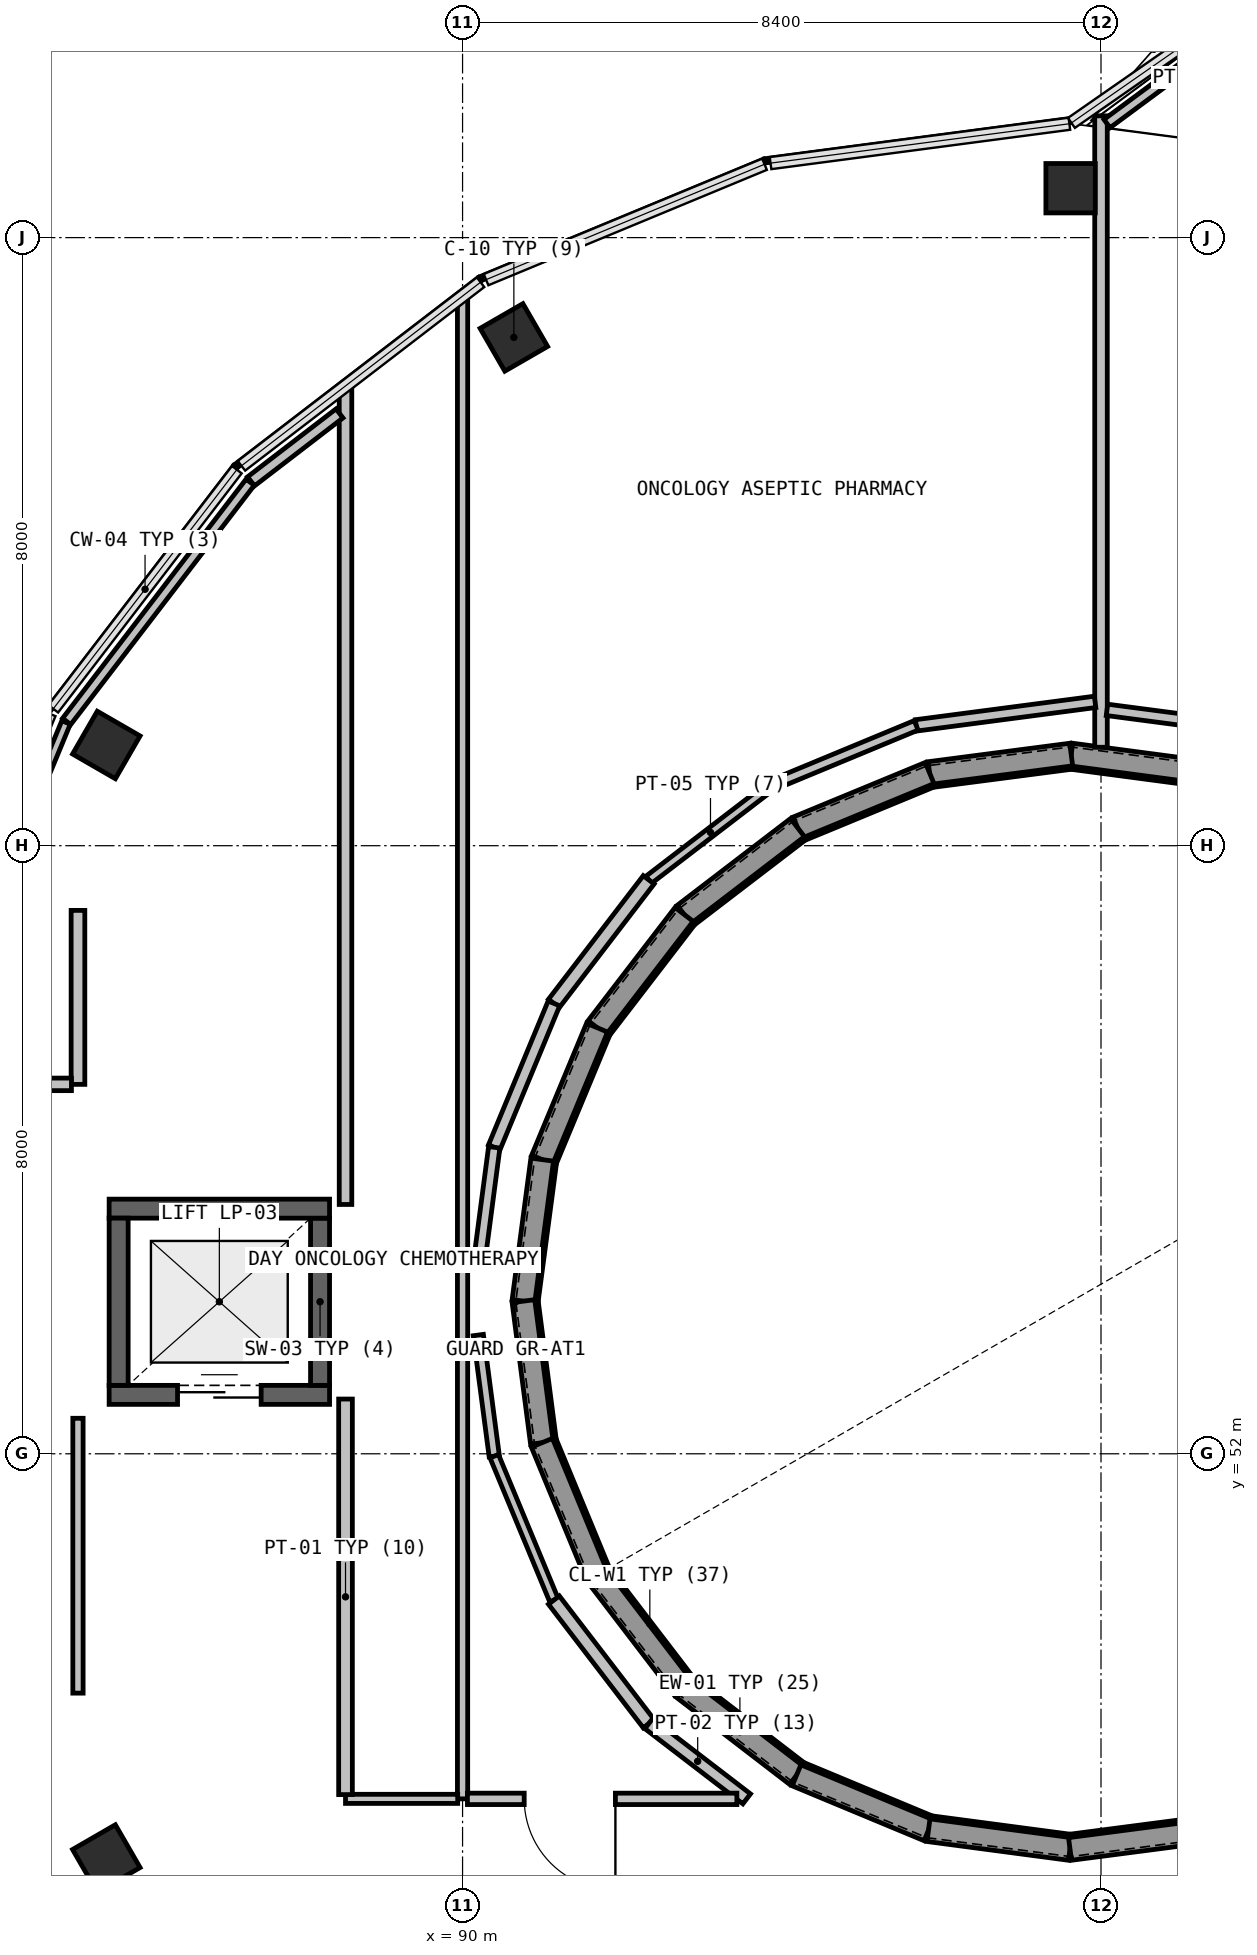
"""IFC4 building model, lengths in metres.
Left out: names, types, materials, properties, quantities, classifications, styles, units other than length and angle.
Written with IfcOpenShell. Run it as: python <this file> out.ifc"""

import sys

from ifc_helpers import new_model, si_unit, direction, frame, frame_2d, origin, origin_2d, place, context, subcontext, project, spatial, rectangle, circle, extrude, element, fill, save


model = new_model("IFC4")
c1 = context("Model", 3, precision=1e-05, world=origin(), true_north=direction((0.0, 1.0)))
c2 = subcontext(c1, "Body", "Model", "MODEL_VIEW")
j1 = project(units=[si_unit("LENGTHUNIT", "METRE"), si_unit("PLANEANGLEUNIT", "RADIAN")], contexts=[c1])
p1 = place(None, origin())
s1 = spatial("IfcSite", under=j1, at=p1, CompositionType="ELEMENT")
p2 = place(p1, origin())
s2 = spatial("IfcBuilding", under=s1, at=p2, CompositionType="ELEMENT")
p3 = place(p2, frame((0.0, 0.0, 15.0)))
s3 = spatial("IfcBuildingStorey", under=s2, at=p3, CompositionType="ELEMENT", Elevation=15.0)
for number, where, z_axis, x_axis in (
    (1, (98.0, 68.65, 0.0), (0.0, 0.0, 1.0), (0.0, 1.0, 0.0)),
    (2, (90.675, 66.687, 0.0), (0.0, 0.0, 1.0), (-0.5, 0.866, 0.0)),
    (3, (85.313, 61.325, 0.0), (0.0, 0.0, 1.0), (-0.866, 0.5, 0.0)),
    (4, (85.313, 46.675, 0.0), (0.0, 0.0, 1.0), (-0.866, -0.5, 0.0)),
):
    element("IfcColumn", number, at=place(p3, frame(where, z_axis=z_axis, x_axis=x_axis)), inside=s3, PredefinedType="COLUMN", context=c2, shape_type="SweptSolid", body=[
        extrude(circle(Radius=0.325, at=origin_2d()), origin(), (0.0, 0.0, 1.0), 4.2),
    ])
p4 = place(p3, frame((99.87, 60.952, 0.0), z_axis=(0.0, 0.0, 1.0), x_axis=(-0.991311701137, 0.131533688416, 0.0)))
e5 = element("IfcWall", 5, at=p4, inside=s3, PredefinedType="SOLIDWALL", context=c2, shape_type="SweptSolid", body=[
    extrude(rectangle(XDim=1.878, YDim=0.3, at=frame_2d((0.939, 0.0))), origin(), (0.0, 0.0, 1.0), 3.895),
])
p5 = place(p3, frame((98.008, 61.199, 0.0), z_axis=(0.0, 0.0, 1.0), x_axis=(-0.991606206969, -0.129294741965, 0.0)))
e6 = element("IfcWall", 6, at=p5, inside=s3, PredefinedType="SOLIDWALL", context=c2, shape_type="SweptSolid", body=[
    extrude(rectangle(XDim=1.879, YDim=0.3, at=frame_2d((0.939, 0.0))), origin(), (0.0, 0.0, 1.0), 3.895),
])
p6 = place(p3, frame((96.145, 60.956, 0.0), z_axis=(0.0, 0.0, 1.0), x_axis=(-0.924236528401, -0.381820428435, 0.0)))
e7 = element("IfcWall", 7, at=p6, inside=s3, PredefinedType="SOLIDWALL", context=c2, shape_type="SweptSolid", body=[
    extrude(rectangle(XDim=1.881, YDim=0.3, at=frame_2d((0.94, 0.0))), origin(), (0.0, 0.0, 1.0), 3.895),
])
p7 = place(p3, frame((94.407, 60.238, 0.0), z_axis=(0.0, 0.0, 1.0), x_axis=(-0.79405161161, -0.607850341861, 0.0)))
e8 = element("IfcWall", 8, at=p7, inside=s3, PredefinedType="SOLIDWALL", context=c2, shape_type="SweptSolid", body=[
    extrude(rectangle(XDim=1.879, YDim=0.3, at=frame_2d((0.939, 0.0))), origin(), (0.0, 0.0, 1.0), 3.895),
])
p8 = place(p3, frame((92.915, 59.096, 0.0), z_axis=(0.0, 0.0, 1.0), x_axis=(-0.609333966613, -0.792913688324, 0.0)))
e9 = element("IfcWall", 9, at=p8, inside=s3, PredefinedType="SOLIDWALL", context=c2, shape_type="SweptSolid", body=[
    extrude(rectangle(XDim=1.879, YDim=0.3, at=frame_2d((0.939, 0.0))), origin(), (0.0, 0.0, 1.0), 3.895),
])
p9 = place(p3, frame((91.77, 57.606, 0.0), z_axis=(0.0, 0.0, 1.0), x_axis=(-0.384006709406, -0.923330302292, 0.0)))
e10 = element("IfcWall", 10, at=p9, inside=s3, PredefinedType="SOLIDWALL", context=c2, shape_type="SweptSolid", body=[
    extrude(rectangle(XDim=1.88, YDim=0.3, at=frame_2d((0.94, 0.0))), origin(), (0.0, 0.0, 1.0), 3.895),
])
p10 = place(p3, frame((91.048, 55.87, 0.0), z_axis=(0.0, 0.0, 1.0), x_axis=(-0.131533688416, -0.991311701137, 0.0)))
e11 = element("IfcWall", 11, at=p10, inside=s3, PredefinedType="SOLIDWALL", context=c2, shape_type="SweptSolid", body=[
    extrude(rectangle(XDim=1.878, YDim=0.3, at=frame_2d((0.939, 0.0))), origin(), (0.0, 0.0, 1.0), 3.895),
])
p11 = place(p3, frame((90.801, 54.008, 0.0), z_axis=(0.0, 0.0, 1.0), x_axis=(0.129294741965, -0.991606206969, 0.0)))
e12 = element("IfcWall", 12, at=p11, inside=s3, PredefinedType="SOLIDWALL", context=c2, shape_type="SweptSolid", body=[
    extrude(rectangle(XDim=1.879, YDim=0.3, at=frame_2d((0.939, 0.0))), origin(), (0.0, 0.0, 1.0), 3.895),
])
p12 = place(p3, frame((91.044, 52.145, 0.0), z_axis=(0.0, 0.0, 1.0), x_axis=(0.381820428435, -0.924236528401, 0.0)))
e13 = element("IfcWall", 13, at=p12, inside=s3, PredefinedType="SOLIDWALL", context=c2, shape_type="SweptSolid", body=[
    extrude(rectangle(XDim=1.881, YDim=0.3, at=frame_2d((0.94, 0.0))), origin(), (0.0, 0.0, 1.0), 3.895),
])
p13 = place(p3, frame((91.762, 50.407, 0.0), z_axis=(0.0, 0.0, 1.0), x_axis=(0.607850341861, -0.79405161161, 0.0)))
e14 = element("IfcWall", 14, at=p13, inside=s3, PredefinedType="SOLIDWALL", context=c2, shape_type="SweptSolid", body=[
    extrude(rectangle(XDim=1.879, YDim=0.3, at=frame_2d((0.939, 0.0))), origin(), (0.0, 0.0, 1.0), 3.895),
])
p14 = place(p3, frame((92.904, 48.915, 0.0), z_axis=(0.0, 0.0, 1.0), x_axis=(0.792913688324, -0.609333966613, 0.0)))
e15 = element("IfcWall", 15, at=p14, inside=s3, PredefinedType="SOLIDWALL", context=c2, shape_type="SweptSolid", body=[
    extrude(rectangle(XDim=1.879, YDim=0.3, at=frame_2d((0.939, 0.0))), origin(), (0.0, 0.0, 1.0), 3.895),
])
p15 = place(p3, frame((94.394, 47.77, 0.0), z_axis=(0.0, 0.0, 1.0), x_axis=(0.923330302292, -0.384006709406, 0.0)))
e16 = element("IfcWall", 16, at=p15, inside=s3, PredefinedType="SOLIDWALL", context=c2, shape_type="SweptSolid", body=[
    extrude(rectangle(XDim=1.88, YDim=0.3, at=frame_2d((0.94, 0.0))), origin(), (0.0, 0.0, 1.0), 3.895),
])
p16 = place(p3, frame((96.13, 47.048, 0.0), z_axis=(0.0, 0.0, 1.0), x_axis=(0.991311701137, -0.131533688416, 0.0)))
e17 = element("IfcWall", 17, at=p16, inside=s3, PredefinedType="SOLIDWALL", context=c2, shape_type="SweptSolid", body=[
    extrude(rectangle(XDim=1.878, YDim=0.3, at=frame_2d((0.939, 0.0))), origin(), (0.0, 0.0, 1.0), 3.895),
])
p17 = place(p3, frame((97.992, 46.801, 0.0), z_axis=(0.0, 0.0, 1.0), x_axis=(0.991606206969, 0.129294741965, 0.0)))
e18 = element("IfcWall", 18, at=p17, inside=s3, PredefinedType="SOLIDWALL", context=c2, shape_type="SweptSolid", body=[
    extrude(rectangle(XDim=1.879, YDim=0.3, at=frame_2d((0.939, 0.0))), origin(), (0.0, 0.0, 1.0), 3.895),
])
p18 = place(p3, frame((85.35, 52.775, 0.0), z_axis=(0.0, 0.0, 1.0), x_axis=(1.0, 0.0, 0.0)))
e19 = element("IfcWall", 19, at=p18, inside=s3, PredefinedType="SHEAR", context=c2, shape_type="SweptSolid", body=[
    extrude(rectangle(XDim=2.9, YDim=0.25, at=frame_2d((1.45, 0.0))), origin(), (0.0, 0.0, 1.0), 3.895),
])
p19 = place(p18, frame((0.9, 0.0, 0.0)))
e20 = element("IfcOpeningElement", 20, at=p19, cuts=e19, PredefinedType="OPENING", context=c2, shape_type="SweptSolid", body=[
    extrude(rectangle(XDim=1.1, YDim=2.15, at=frame_2d((0.55, 1.075))), frame((0.0, 0.135, 0.0), z_axis=(0.0, -1.0, 0.0), x_axis=(1.0, 0.0, 0.0)), (0.0, 0.0, 1.0), 0.27),
])
p20 = place(p3, frame((88.125, 52.9, 0.0), z_axis=(0.0, 0.0, 1.0), x_axis=(0.0, 1.0, 0.0)))
e21 = element("IfcWall", 21, at=p20, inside=s3, PredefinedType="SHEAR", context=c2, shape_type="SweptSolid", body=[
    extrude(rectangle(XDim=2.2, YDim=0.25, at=frame_2d((1.1, 0.0))), origin(), (0.0, 0.0, 1.0), 3.895),
])
p21 = place(p3, frame((88.25, 55.225, 0.0), z_axis=(0.0, 0.0, 1.0), x_axis=(-1.0, 0.0, 0.0)))
e22 = element("IfcWall", 22, at=p21, inside=s3, PredefinedType="SHEAR", context=c2, shape_type="SweptSolid", body=[
    extrude(rectangle(XDim=2.9, YDim=0.25, at=frame_2d((1.45, 0.0))), origin(), (0.0, 0.0, 1.0), 3.895),
])
p22 = place(p3, frame((85.475, 55.1, 0.0), z_axis=(0.0, 0.0, 1.0), x_axis=(0.0, -1.0, 0.0)))
e23 = element("IfcWall", 23, at=p22, inside=s3, PredefinedType="SHEAR", context=c2, shape_type="SweptSolid", body=[
    extrude(rectangle(XDim=2.2, YDim=0.25, at=frame_2d((1.1, 0.0))), origin(), (0.0, 0.0, 1.0), 3.895),
])
p23 = place(p3, frame((90.0, 67.217, 0.0), z_axis=(0.0, 0.0, 1.0), x_axis=(0.0, -1.0, 0.0)))
e24 = element("IfcWall", 24, at=p23, inside=s3, PredefinedType="PARTITIONING", context=c2, shape_type="SweptSolid", body=[
    extrude(rectangle(XDim=19.757, YDim=0.135, at=frame_2d((9.878, 0.0))), origin(), (0.0, 0.0, 1.0), 3.895),
])
p24 = place(p3, frame((89.936, 47.46, 0.0), z_axis=(0.0, 0.0, 1.0), x_axis=(-1.0, 0.0, 0.0)))
e25 = element("IfcWall", 25, at=p24, inside=s3, PredefinedType="PARTITIONING", context=c2, shape_type="SweptSolid", body=[
    extrude(rectangle(XDim=1.476, YDim=0.12, at=frame_2d((0.738, 0.0))), origin(), (0.0, 0.0, 1.0), 3.895),
])
p25 = place(p3, frame((88.46, 47.516, 0.0), z_axis=(0.0, 0.0, 1.0), x_axis=(0.0, 1.0, 0.0)))
e26 = element("IfcWall", 26, at=p25, inside=s3, PredefinedType="PARTITIONING", context=c2, shape_type="SweptSolid", body=[
    extrude(rectangle(XDim=5.204, YDim=0.18, at=frame_2d((2.602, 0.0))), origin(), (0.0, 0.0, 1.0), 3.895),
])
p26 = place(p3, frame((88.46, 55.28, 0.0), z_axis=(0.0, 0.0, 1.0), x_axis=(0.0, 1.0, 0.0)))
e27 = element("IfcWall", 27, at=p26, inside=s3, PredefinedType="PARTITIONING", context=c2, shape_type="SweptSolid", body=[
    extrude(rectangle(XDim=10.755, YDim=0.165, at=frame_2d((5.377, 0.0))), origin(), (0.0, 0.0, 1.0), 3.895),
])
p27 = place(p3, frame((88.381, 65.687, 0.0), z_axis=(0.0, 0.0, 1.0), x_axis=(-0.793081339459, -0.609115743519, 0.0)))
e28 = element("IfcWall", 28, at=p27, inside=s3, PredefinedType="PARTITIONING", context=c2, shape_type="SweptSolid", body=[
    extrude(rectangle(XDim=1.468, YDim=0.15, at=frame_2d((0.734, 0.0))), origin(), (0.0, 0.0, 1.0), 3.895),
])
p28 = place(p3, frame((87.206, 64.782, 0.0), z_axis=(0.0, 0.0, 1.0), x_axis=(-0.608806174349, -0.793319003979, 0.0)))
e29 = element("IfcWall", 29, at=p28, inside=s3, PredefinedType="PARTITIONING", context=c2, shape_type="SweptSolid", body=[
    extrude(rectangle(XDim=3.967, YDim=0.135, at=frame_2d((1.983, 0.0))), origin(), (0.0, 0.0, 1.0), 3.895),
])
p29 = place(p3, frame((84.783, 61.621, 0.0), z_axis=(0.0, 0.0, 1.0), x_axis=(-0.382589305367, -0.923918515573, 0.0)))
e30 = element("IfcWall", 30, at=p29, inside=s3, PredefinedType="PARTITIONING", context=c2, shape_type="SweptSolid", body=[
    extrude(rectangle(XDim=2.149, YDim=0.12, at=frame_2d((1.074, 0.0))), origin(), (0.0, 0.0, 1.0), 3.895),
])
p30 = place(p3, frame((84.94, 59.149, 0.0), z_axis=(0.0, 0.0, 1.0), x_axis=(0.0, -1.0, 0.0)))
e31 = element("IfcWall", 31, at=p30, inside=s3, PredefinedType="PARTITIONING", context=c2, shape_type="SweptSolid", body=[
    extrude(rectangle(XDim=2.289, YDim=0.18, at=frame_2d((1.145, 0.0))), origin(), (0.0, 0.0, 1.0), 3.895),
])
p31 = place(p3, frame((84.854, 56.86, 0.0), z_axis=(0.0, 0.0, 1.0), x_axis=(-1.0, 0.0, 0.0)))
e32 = element("IfcWall", 32, at=p31, inside=s3, PredefinedType="PARTITIONING", context=c2, shape_type="SweptSolid", body=[
    extrude(rectangle(XDim=1.966, YDim=0.165, at=frame_2d((0.983, 0.0))), origin(), (0.0, 0.0, 1.0), 3.895),
])
p32 = place(p3, frame((84.94, 52.467, 0.0), z_axis=(0.0, 0.0, 1.0), x_axis=(0.0, -1.0, 0.0)))
e33 = element("IfcWall", 33, at=p32, inside=s3, PredefinedType="PARTITIONING", context=c2, shape_type="SweptSolid", body=[
    extrude(rectangle(XDim=3.616, YDim=0.135, at=frame_2d((1.808, 0.0))), origin(), (0.0, 0.0, 1.0), 3.895),
])
p33 = place(p3, frame((98.4, 69.602, 0.0), z_axis=(0.0, 0.0, 1.0), x_axis=(0.0, -1.0, 0.0)))
e34 = element("IfcWall", 34, at=p33, inside=s3, PredefinedType="PARTITIONING", context=c2, shape_type="SweptSolid", body=[
    extrude(rectangle(XDim=8.307, YDim=0.165, at=frame_2d((4.154, 0.0))), origin(), (0.0, 0.0, 1.0), 3.895),
])
p34 = place(p3, frame((98.322, 61.892, 0.0), z_axis=(0.0, 0.0, 1.0), x_axis=(-0.991489958529, -0.130183186839, 0.0)))
e35 = element("IfcWall", 35, at=p34, inside=s3, PredefinedType="PARTITIONING", context=c2, shape_type="SweptSolid", body=[
    extrude(rectangle(XDim=2.374, YDim=0.15, at=frame_2d((1.187, 0.0))), origin(), (0.0, 0.0, 1.0), 3.895),
])
p35 = place(p3, frame((95.968, 61.583, 0.0), z_axis=(0.0, 0.0, 1.0), x_axis=(-0.923745197655, -0.383007584532, 0.0)))
e36 = element("IfcWall", 36, at=p35, inside=s3, PredefinedType="PARTITIONING", context=c2, shape_type="SweptSolid", body=[
    extrude(rectangle(XDim=2.049, YDim=0.135, at=frame_2d((1.025, 0.0))), origin(), (0.0, 0.0, 1.0), 3.895),
])
p36 = place(p3, frame((94.075, 60.798, 0.0), z_axis=(0.0, 0.0, 1.0), x_axis=(-0.793491289639, -0.608581607729, 0.0)))
e37 = element("IfcWall", 37, at=p36, inside=s3, PredefinedType="PARTITIONING", context=c2, shape_type="SweptSolid", body=[
    extrude(rectangle(XDim=2.049, YDim=0.12, at=frame_2d((1.024, 0.0))), origin(), (0.0, 0.0, 1.0), 3.895),
])
p37 = place(p3, frame((92.449, 59.551, 0.0), z_axis=(0.0, 0.0, 1.0), x_axis=(-0.608581607729, -0.793491289639, 0.0)))
e38 = element("IfcWall", 38, at=p37, inside=s3, PredefinedType="PARTITIONING", context=c2, shape_type="SweptSolid", body=[
    extrude(rectangle(XDim=2.049, YDim=0.18, at=frame_2d((1.024, 0.0))), origin(), (0.0, 0.0, 1.0), 3.895),
])
p38 = place(p3, frame((91.202, 57.925, 0.0), z_axis=(0.0, 0.0, 1.0), x_axis=(-0.383007584532, -0.923745197655, 0.0)))
e39 = element("IfcWall", 39, at=p38, inside=s3, PredefinedType="PARTITIONING", context=c2, shape_type="SweptSolid", body=[
    extrude(rectangle(XDim=2.049, YDim=0.165, at=frame_2d((1.025, 0.0))), origin(), (0.0, 0.0, 1.0), 3.895),
])
p39 = place(p3, frame((90.417, 56.032, 0.0), z_axis=(0.0, 0.0, 1.0), x_axis=(-0.130591993984, -0.991436196186, 0.0)))
e40 = element("IfcWall", 40, at=p39, inside=s3, PredefinedType="PARTITIONING", context=c2, shape_type="SweptSolid", body=[
    extrude(rectangle(XDim=1.608, YDim=0.15, at=frame_2d((0.804, 0.0))), origin(), (0.0, 0.0, 1.0), 3.895),
])
p40 = place(p3, frame((90.207, 53.562, 0.0), z_axis=(0.0, 0.0, 1.0), x_axis=(0.130591993984, -0.991436196186, 0.0)))
e41 = element("IfcWall", 41, at=p40, inside=s3, PredefinedType="PARTITIONING", context=c2, shape_type="SweptSolid", body=[
    extrude(rectangle(XDim=1.608, YDim=0.135, at=frame_2d((0.804, 0.0))), origin(), (0.0, 0.0, 1.0), 3.895),
])
p41 = place(p3, frame((90.417, 51.968, 0.0), z_axis=(0.0, 0.0, 1.0), x_axis=(0.383007584532, -0.923745197655, 0.0)))
e42 = element("IfcWall", 42, at=p41, inside=s3, PredefinedType="PARTITIONING", context=c2, shape_type="SweptSolid", body=[
    extrude(rectangle(XDim=2.049, YDim=0.12, at=frame_2d((1.025, 0.0))), origin(), (0.0, 0.0, 1.0), 3.895),
])
p42 = place(p3, frame((91.202, 50.075, 0.0), z_axis=(0.0, 0.0, 1.0), x_axis=(0.608581607729, -0.793491289639, 0.0)))
e43 = element("IfcWall", 43, at=p42, inside=s3, PredefinedType="PARTITIONING", context=c2, shape_type="SweptSolid", body=[
    extrude(rectangle(XDim=2.049, YDim=0.18, at=frame_2d((1.024, 0.0))), origin(), (0.0, 0.0, 1.0), 3.895),
])
p43 = place(p3, frame((92.449, 48.449, 0.0), z_axis=(0.0, 0.0, 1.0), x_axis=(0.793388644719, -0.60871541662, 0.0)))
e44 = element("IfcWall", 44, at=p43, inside=s3, PredefinedType="PARTITIONING", context=c2, shape_type="SweptSolid", body=[
    extrude(rectangle(XDim=1.625, YDim=0.165, at=frame_2d((0.812, 0.0))), origin(), (0.0, 0.0, 1.0), 3.895),
])
p44 = place(p3, frame((93.609, 47.46, 0.0), z_axis=(0.0, 0.0, 1.0), x_axis=(-1.0, 0.0, 0.0)))
e45 = element("IfcWall", 45, at=p44, inside=s3, PredefinedType="PARTITIONING", context=c2, shape_type="SweptSolid", body=[
    extrude(rectangle(XDim=3.545, YDim=0.15, at=frame_2d((1.772, 0.0))), origin(), (0.0, 0.0, 1.0), 3.895),
])
p45 = place(p44, frame((1.598, 0.0, 0.0)))
e46 = element("IfcOpeningElement", 46, at=p45, cuts=e45, PredefinedType="OPENING", context=c2, shape_type="SweptSolid", body=[
    extrude(rectangle(XDim=1.2, YDim=2.15, at=frame_2d((0.6, 1.075))), frame((0.0, 0.085, 0.0), z_axis=(0.0, -1.0, 0.0), x_axis=(1.0, 0.0, 0.0)), (0.0, 0.0, 1.0), 0.17),
])
p46 = place(p3, frame((100.032, 61.583, 0.0), z_axis=(0.0, 0.0, 1.0), x_axis=(-0.991473913665, 0.130305328065, 0.0)))
e47 = element("IfcWall", 47, at=p46, inside=s3, PredefinedType="PARTITIONING", context=c2, shape_type="SweptSolid", body=[
    extrude(rectangle(XDim=1.566, YDim=0.15, at=frame_2d((0.783, 0.0))), origin(), (0.0, 0.0, 1.0), 3.895),
])
p47 = place(p3, frame((98.479, 69.5, 0.0), z_axis=(0.0, 0.0, 1.0), x_axis=(0.803937569327, 0.594713699711, 0.0)))
e48 = element("IfcWall", 48, at=p47, inside=s3, PredefinedType="PARTITIONING", context=c2, shape_type="SweptSolid", body=[
    extrude(rectangle(XDim=4.148, YDim=0.135, at=frame_2d((2.074, 0.0))), origin(), (0.0, 0.0, 1.0), 3.895),
])
p48 = place(p19, origin())
e49 = element("IfcDoor", 49, at=p48, inside=s3, OperationType="DOUBLE_DOOR_SLIDING", PredefinedType="DOOR", context=c2, shape_type="SweptSolid", body=[
    extrude(rectangle(XDim=1.1, YDim=2.15, at=frame_2d((0.55, 1.075))), frame((0.0, 0.025, 0.0), z_axis=(0.0, -1.0, 0.0), x_axis=(1.0, 0.0, 0.0)), (0.0, 0.0, 1.0), 0.05),
])
fill(e20, e49)
p49 = place(p45, origin())
e50 = element("IfcDoor", 50, at=p49, inside=s3, OperationType="SINGLE_SWING_RIGHT", PredefinedType="DOOR", context=c2, shape_type="SweptSolid", body=[
    extrude(rectangle(XDim=1.2, YDim=2.15, at=frame_2d((0.6, 1.075))), frame((0.0, 0.025, 0.0), z_axis=(0.0, -1.0, 0.0), x_axis=(1.0, 0.0, 0.0)), (0.0, 0.0, 1.0), 0.05),
])
fill(e46, e50)
save(model, sys.argv[1])
